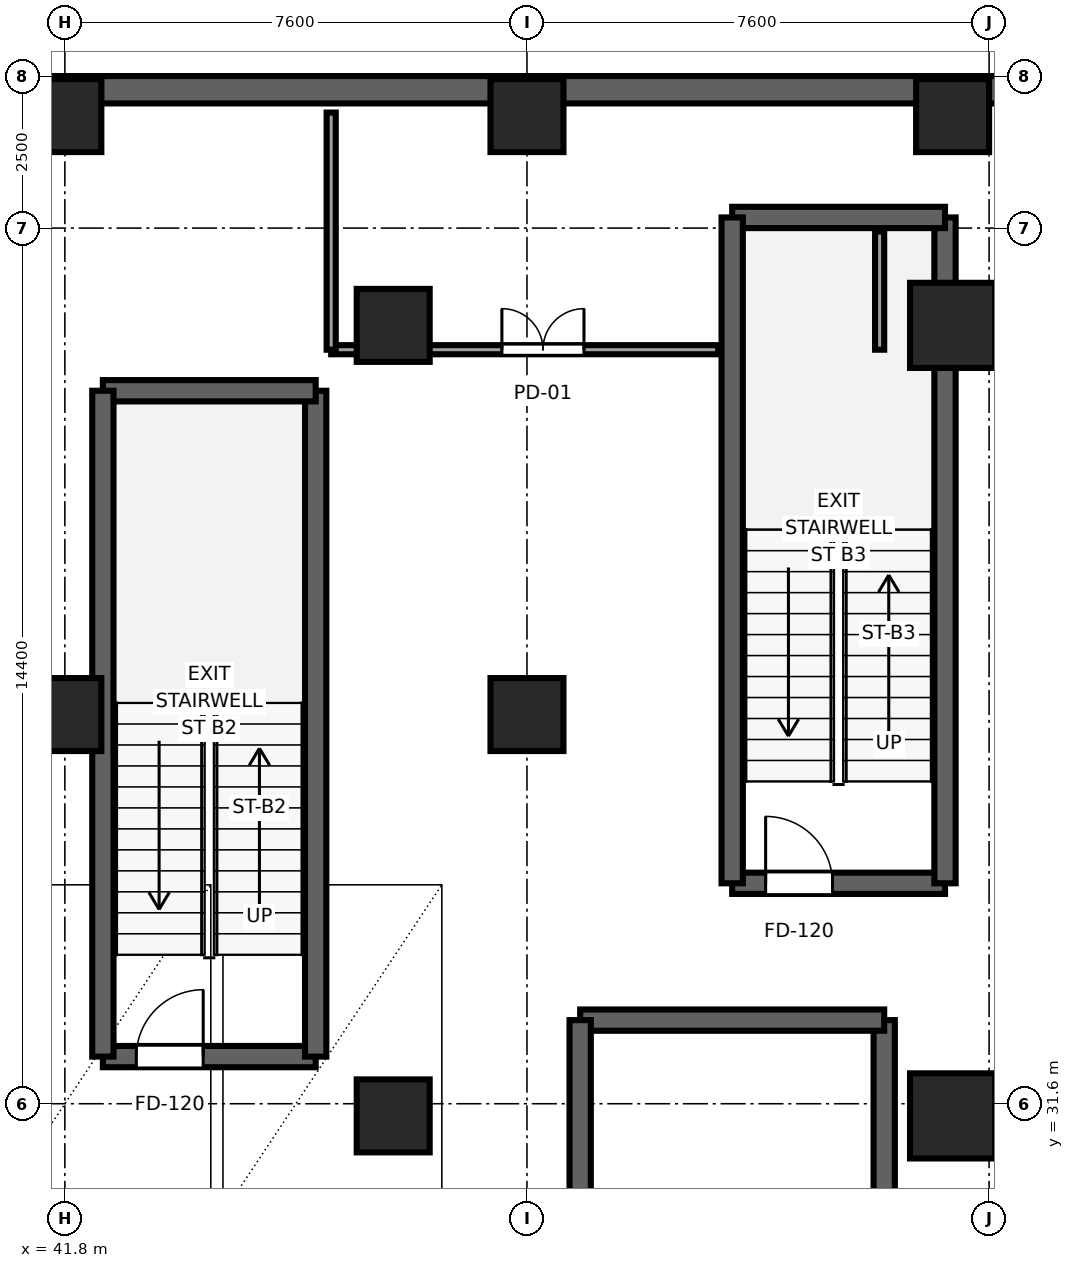
"""IFC4 building model, lengths in metres.
Left out: names, types, materials, properties, quantities, classifications, styles, units other than length and angle.
Written with IfcOpenShell. Run it as: python <this file> out.ifc"""

import sys

from ifc_helpers import new_model, si_unit, direction, frame, frame_2d, origin, origin_2d, place, context, subcontext, project, spatial, rectangle, extrude, source, transform, mapped, element, fill, save


model = new_model("IFC4")
c1 = context("Model", 3, precision=1e-05, world=origin(), true_north=direction((0.0, 1.0)))
c2 = subcontext(c1, "Body", "Model", "MODEL_VIEW")
j1 = project(units=[si_unit("LENGTHUNIT", "METRE"), si_unit("PLANEANGLEUNIT", "RADIAN")], contexts=[c1])
p1 = place(None, origin())
s1 = spatial("IfcSite", under=j1, at=p1, CompositionType="ELEMENT")
p2 = place(p1, origin())
s2 = spatial("IfcBuilding", under=s1, at=p2, CompositionType="ELEMENT")
p3 = place(p2, frame((0.0, 0.0, -14.4)))
s3 = spatial("IfcBuildingStorey", under=s2, at=p3, CompositionType="ELEMENT", Elevation=-14.4)
p4 = place(p3, frame((42.425, 32.375, 0.0), z_axis=(0.0, 0.0, 1.0), x_axis=(1.0, 0.0, 0.0)))
e1 = element("IfcWall", 1, at=p4, inside=s3, PredefinedType="SHEAR", context=c2, shape_type="SweptSolid", body=[
    extrude(rectangle(XDim=3.5, YDim=0.35, at=frame_2d((1.75, 0.0))), origin(), (0.0, 0.0, 1.0), 4.8),
])
p5 = place(p4, frame((0.55, 0.0, 0.0)))
e2 = element("IfcOpeningElement", 2, at=p5, cuts=e1, PredefinedType="OPENING", context=c2, shape_type="SweptSolid", body=[
    extrude(rectangle(XDim=1.1, YDim=2.12, at=frame_2d((0.55, 1.06))), frame((0.0, 0.185, 0.0), z_axis=(0.0, -1.0, 0.0), x_axis=(1.0, 0.0, 0.0)), (0.0, 0.0, 1.0), 0.37),
])
p6 = place(p3, frame((45.925, 32.375, 0.0), z_axis=(0.0, 0.0, 1.0), x_axis=(0.0, 1.0, 0.0)))
e3 = element("IfcWall", 3, at=p6, inside=s3, PredefinedType="SHEAR", context=c2, shape_type="SweptSolid", body=[
    extrude(rectangle(XDim=10.95, YDim=0.35, at=frame_2d((5.475, 0.0))), origin(), (0.0, 0.0, 1.0), 4.8),
])
p7 = place(p3, frame((45.925, 43.325, 0.0), z_axis=(0.0, 0.0, 1.0), x_axis=(-1.0, 0.0, 0.0)))
e4 = element("IfcWall", 4, at=p7, inside=s3, PredefinedType="SHEAR", context=c2, shape_type="SweptSolid", body=[
    extrude(rectangle(XDim=3.5, YDim=0.35, at=frame_2d((1.75, 0.0))), origin(), (0.0, 0.0, 1.0), 4.8),
])
p8 = place(p3, frame((42.425, 43.325, 0.0), z_axis=(0.0, 0.0, 1.0), x_axis=(0.0, -1.0, 0.0)))
e5 = element("IfcWall", 5, at=p8, inside=s3, PredefinedType="SHEAR", context=c2, shape_type="SweptSolid", body=[
    extrude(rectangle(XDim=10.95, YDim=0.35, at=frame_2d((5.475, 0.0))), origin(), (0.0, 0.0, 1.0), 4.8),
])
p9 = place(p3, frame((52.775, 35.225, 0.0), z_axis=(0.0, 0.0, 1.0), x_axis=(1.0, 0.0, 0.0)))
e6 = element("IfcWall", 6, at=p9, inside=s3, PredefinedType="SHEAR", context=c2, shape_type="SweptSolid", body=[
    extrude(rectangle(XDim=3.5, YDim=0.35, at=frame_2d((1.75, 0.0))), origin(), (0.0, 0.0, 1.0), 4.8),
])
p10 = place(p9, frame((0.55, 0.0, 0.0)))
e7 = element("IfcOpeningElement", 7, at=p10, cuts=e6, PredefinedType="OPENING", context=c2, shape_type="SweptSolid", body=[
    extrude(rectangle(XDim=1.1, YDim=2.12, at=frame_2d((0.55, 1.06))), frame((0.0, 0.185, 0.0), z_axis=(0.0, -1.0, 0.0), x_axis=(1.0, 0.0, 0.0)), (0.0, 0.0, 1.0), 0.37),
])
p11 = place(p3, frame((56.275, 35.225, 0.0), z_axis=(0.0, 0.0, 1.0), x_axis=(0.0, 1.0, 0.0)))
e8 = element("IfcWall", 8, at=p11, inside=s3, PredefinedType="SHEAR", context=c2, shape_type="SweptSolid", body=[
    extrude(rectangle(XDim=10.95, YDim=0.35, at=frame_2d((5.475, 0.0))), origin(), (0.0, 0.0, 1.0), 4.8),
])
p12 = place(p3, frame((56.275, 46.175, 0.0), z_axis=(0.0, 0.0, 1.0), x_axis=(-1.0, 0.0, 0.0)))
e9 = element("IfcWall", 9, at=p12, inside=s3, PredefinedType="SHEAR", context=c2, shape_type="SweptSolid", body=[
    extrude(rectangle(XDim=3.5, YDim=0.35, at=frame_2d((1.75, 0.0))), origin(), (0.0, 0.0, 1.0), 4.8),
])
p13 = place(p3, frame((52.775, 46.175, 0.0), z_axis=(0.0, 0.0, 1.0), x_axis=(0.0, -1.0, 0.0)))
e10 = element("IfcWall", 10, at=p13, inside=s3, PredefinedType="SHEAR", context=c2, shape_type="SweptSolid", body=[
    extrude(rectangle(XDim=10.95, YDim=0.35, at=frame_2d((5.475, 0.0))), origin(), (0.0, 0.0, 1.0), 4.8),
])
p14 = place(p3, frame((55.275, 20.025, 0.0), z_axis=(0.0, 0.0, 1.0), x_axis=(0.0, 1.0, 0.0)))
e11 = element("IfcWall", 11, at=p14, inside=s3, PredefinedType="SHEAR", context=c2, shape_type="SweptSolid", body=[
    extrude(rectangle(XDim=12.95, YDim=0.35, at=frame_2d((6.475, 0.0))), origin(), (0.0, 0.0, 1.0), 4.8),
])
p15 = place(p3, frame((55.275, 32.975, 0.0), z_axis=(0.0, 0.0, 1.0), x_axis=(-1.0, 0.0, 0.0)))
e12 = element("IfcWall", 12, at=p15, inside=s3, PredefinedType="SHEAR", context=c2, shape_type="SweptSolid", body=[
    extrude(rectangle(XDim=5.0, YDim=0.35, at=frame_2d((2.5, 0.0))), origin(), (0.0, 0.0, 1.0), 4.8),
])
p16 = place(p3, frame((50.275, 32.975, 0.0), z_axis=(0.0, 0.0, 1.0), x_axis=(0.0, -1.0, 0.0)))
e13 = element("IfcWall", 13, at=p16, inside=s3, PredefinedType="SHEAR", context=c2, shape_type="SweptSolid", body=[
    extrude(rectangle(XDim=12.95, YDim=0.35, at=frame_2d((6.475, 0.0))), origin(), (0.0, 0.0, 1.0), 4.8),
])
p17 = place(p3, frame((-8.4, 48.275, 0.0), z_axis=(0.0, 0.0, 1.0), x_axis=(1.0, 0.0, 0.0)))
e14 = element("IfcWall", 14, at=p17, inside=s3, PredefinedType="SOLIDWALL", context=c2, shape_type="SweptSolid", body=[
    extrude(rectangle(XDim=73.8, YDim=0.45, at=frame_2d((36.9, 0.0))), origin(), (0.0, 0.0, 1.0), 4.8),
])
m1 = source(origin(), c2, "Body", "SweptSolid", [
    extrude(rectangle(XDim=1.2, YDim=1.2, at=origin_2d()), origin(), (0.0, 0.0, 1.0), 5.2),
])
p18 = place(p3, frame((47.2, 31.4, -0.4), z_axis=(0.0, 0.0, 1.0), x_axis=(1.0, 0.0, 0.0)))
e15 = element("IfcColumn", 15, at=p18, inside=s3, PredefinedType="COLUMN", context=c2, shape_type="MappedRepresentation", body=[
    mapped(m1, transform((0.0, 0.0, 0.0), x_axis=(1.0, 0.0, 0.0), y_axis=(0.0, 1.0, 0.0), z_axis=(0.0, 0.0, 1.0), scale=1.0)),
])
m2 = source(origin(), c2, "Body", "SweptSolid", [
    extrude(rectangle(XDim=1.4, YDim=1.4, at=origin_2d()), origin(), (0.0, 0.0, 1.0), 5.2),
])
p19 = place(p3, frame((56.4, 31.4, -0.4), z_axis=(0.0, 0.0, 1.0), x_axis=(1.0, 0.0, 0.0)))
e16 = element("IfcColumn", 16, at=p19, inside=s3, PredefinedType="COLUMN", context=c2, shape_type="MappedRepresentation", body=[
    mapped(m2, transform((0.0, 0.0, 0.0), x_axis=(1.0, 0.0, 0.0), y_axis=(0.0, 1.0, 0.0), z_axis=(0.0, 0.0, 1.0), scale=1.0)),
])
p20 = place(p3, frame((47.2, 44.4, -0.4), z_axis=(0.0, 0.0, 1.0), x_axis=(1.0, 0.0, 0.0)))
e17 = element("IfcColumn", 17, at=p20, inside=s3, PredefinedType="COLUMN", context=c2, shape_type="MappedRepresentation", body=[
    mapped(m1, transform((0.0, 0.0, 0.0), x_axis=(1.0, 0.0, 0.0), y_axis=(0.0, 1.0, 0.0), z_axis=(0.0, 0.0, 1.0), scale=1.0)),
])
p21 = place(p3, frame((56.4, 44.4, -0.4), z_axis=(0.0, 0.0, 1.0), x_axis=(1.0, 0.0, 0.0)))
e18 = element("IfcColumn", 18, at=p21, inside=s3, PredefinedType="COLUMN", context=c2, shape_type="MappedRepresentation", body=[
    mapped(m2, transform((0.0, 0.0, 0.0), x_axis=(1.0, 0.0, 0.0), y_axis=(0.0, 1.0, 0.0), z_axis=(0.0, 0.0, 1.0), scale=1.0)),
])
for number, where, z_axis, x_axis in (
    (19, (41.8, 47.85, -0.4), (0.0, 0.0, 1.0), (1.0, 0.0, 0.0)),
    (20, (49.4, 47.85, -0.4), (0.0, 0.0, 1.0), (1.0, 0.0, 0.0)),
    (21, (56.4, 47.85, -0.4), (0.0, 0.0, 1.0), (1.0, 0.0, 0.0)),
    (22, (41.8, 38.0, -0.4), (0.0, 0.0, 1.0), (1.0, 0.0, 0.0)),
    (23, (49.4, 38.0, -0.4), (0.0, 0.0, 1.0), (1.0, 0.0, 0.0)),
):
    element("IfcColumn", number, at=place(p3, frame(where, z_axis=z_axis, x_axis=x_axis)), inside=s3, PredefinedType="COLUMN", context=c2, shape_type="MappedRepresentation", body=[
        mapped(m1, transform((0.0, 0.0, 0.0), x_axis=(1.0, 0.0, 0.0), y_axis=(0.0, 1.0, 0.0), z_axis=(0.0, 0.0, 1.0), scale=1.0)),
    ])
p22 = place(p3, frame((46.18, 44.0, 0.0), z_axis=(0.0, 0.0, 1.0), x_axis=(1.0, 0.0, 0.0)))
e24 = element("IfcWall", 24, at=p22, inside=s3, PredefinedType="PARTITIONING", context=c2, shape_type="SweptSolid", body=[
    extrude(rectangle(XDim=6.365, YDim=0.15, at=frame_2d((3.183, 0.0))), origin(), (0.0, 0.0, 1.0), 4.54),
])
p23 = place(p22, frame((2.808, 0.0, 0.0)))
e25 = element("IfcOpeningElement", 25, at=p23, cuts=e24, PredefinedType="OPENING", context=c2, shape_type="SweptSolid", body=[
    extrude(rectangle(XDim=1.35, YDim=2.15, at=frame_2d((0.675, 1.075))), frame((0.0, 0.085, 0.0), z_axis=(0.0, -1.0, 0.0), x_axis=(1.0, 0.0, 0.0)), (0.0, 0.0, 1.0), 0.17),
])
p24 = place(p3, frame((46.18, 44.0, 0.0), z_axis=(0.0, 0.0, 1.0), x_axis=(0.0, 1.0, 0.0)))
e26 = element("IfcWall", 26, at=p24, inside=s3, PredefinedType="PARTITIONING", context=c2, shape_type="SweptSolid", body=[
    extrude(rectangle(XDim=3.9, YDim=0.15, at=frame_2d((1.95, 0.0))), origin(), (0.0, 0.0, 1.0), 4.54),
])
p25 = place(p3, frame((55.2, 44.0, 0.0), z_axis=(0.0, 0.0, 1.0), x_axis=(0.0, 1.0, 0.0)))
e27 = element("IfcWall", 27, at=p25, inside=s3, PredefinedType="PARTITIONING", context=c2, shape_type="SweptSolid", body=[
    extrude(rectangle(XDim=1.945, YDim=0.15, at=frame_2d((0.973, 0.0))), origin(), (0.0, 0.0, 1.0), 4.54),
])
m3 = source(origin(), c2, "Body", "SweptSolid", [
    extrude(rectangle(XDim=1.1, YDim=2.12, at=frame_2d((0.55, 1.06))), frame((0.0, 0.025, 0.0), z_axis=(0.0, -1.0, 0.0), x_axis=(1.0, 0.0, 0.0)), (0.0, 0.0, 1.0), 0.05),
])
p26 = place(p5, origin())
e28 = element("IfcDoor", 28, at=p26, inside=s3, OperationType="SINGLE_SWING_RIGHT", PredefinedType="DOOR", context=c2, shape_type="MappedRepresentation", body=[
    mapped(m3, transform((0.0, 0.0, 0.0), x_axis=(1.0, 0.0, 0.0), y_axis=(0.0, 1.0, 0.0), z_axis=(0.0, 0.0, 1.0), scale=1.0)),
])
fill(e2, e28)
p27 = place(p10, origin())
e29 = element("IfcDoor", 29, at=p27, inside=s3, OperationType="SINGLE_SWING_LEFT", PredefinedType="DOOR", context=c2, shape_type="MappedRepresentation", body=[
    mapped(m3, transform((0.0, 0.0, 0.0), x_axis=(1.0, 0.0, 0.0), y_axis=(0.0, 1.0, 0.0), z_axis=(0.0, 0.0, 1.0), scale=1.0)),
])
fill(e7, e29)
m4 = source(origin(), c2, "Body", "SweptSolid", [
    extrude(rectangle(XDim=1.35, YDim=2.15, at=frame_2d((0.675, 1.075))), frame((0.0, 0.025, 0.0), z_axis=(0.0, -1.0, 0.0), x_axis=(1.0, 0.0, 0.0)), (0.0, 0.0, 1.0), 0.05),
])
p28 = place(p23, origin())
e30 = element("IfcDoor", 30, at=p28, inside=s3, OperationType="DOUBLE_DOOR_SINGLE_SWING", PredefinedType="DOOR", context=c2, shape_type="MappedRepresentation", body=[
    mapped(m4, transform((0.0, 0.0, 0.0), x_axis=(1.0, 0.0, 0.0), y_axis=(0.0, 1.0, 0.0), z_axis=(0.0, 0.0, 1.0), scale=1.0)),
])
fill(e25, e30)
save(model, sys.argv[1])
